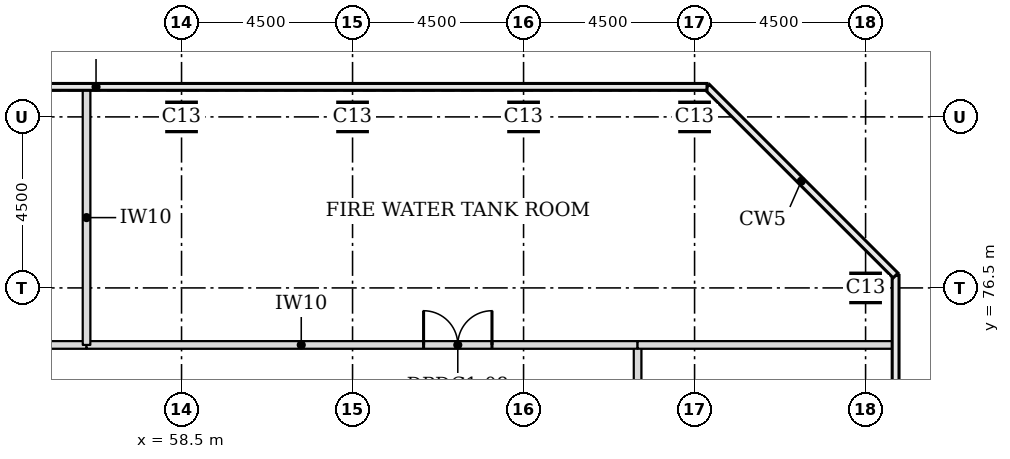
"""IFC4 building model, lengths in metres.
Left out: names, types, materials, properties, quantities, classifications, styles, units other than length and angle.
Written with IfcOpenShell. Run it as: python <this file> out.ifc"""

import sys

from ifc_helpers import new_model, si_unit, direction, frame, frame_2d, origin, origin_2d, place, context, subcontext, project, spatial, rectangle, extrude, element, fill, save


model = new_model("IFC4")
c1 = context("Model", 3, precision=1e-05, world=origin(), true_north=direction((0.0, 1.0)))
c2 = subcontext(c1, "Body", "Model", "MODEL_VIEW")
j1 = project(units=[si_unit("LENGTHUNIT", "METRE"), si_unit("PLANEANGLEUNIT", "RADIAN")], contexts=[c1])
p1 = place(None, origin())
s1 = spatial("IfcSite", under=j1, at=p1, CompositionType="ELEMENT")
p2 = place(p1, origin())
s2 = spatial("IfcBuilding", under=s1, at=p2, CompositionType="ELEMENT")
p3 = place(p2, frame((0.0, 0.0, 263.7)))
s3 = spatial("IfcBuildingStorey", under=s2, at=p3, CompositionType="ELEMENT", Elevation=263.7)
for number, where, z_axis, x_axis in (
    (1, (76.5, 76.5, 0.0), (0.0, 0.0, 1.0), (1.0, 0.0, 0.0)),
    (2, (58.5, 81.0, 0.0), (0.0, 0.0, 1.0), (1.0, 0.0, 0.0)),
    (3, (63.0, 81.0, 0.0), (0.0, 0.0, 1.0), (1.0, 0.0, 0.0)),
    (4, (67.5, 81.0, 0.0), (0.0, 0.0, 1.0), (1.0, 0.0, 0.0)),
    (5, (72.0, 81.0, 0.0), (0.0, 0.0, 1.0), (1.0, 0.0, 0.0)),
):
    element("IfcColumn", number, at=place(p3, frame(where, z_axis=z_axis, x_axis=x_axis)), inside=s3, PredefinedType="COLUMN", context=c2, shape_type="SweptSolid", body=[
        extrude(rectangle(XDim=0.7, YDim=0.7, at=origin_2d()), origin(), (0.0, 0.0, 1.0), 5.0),
    ])
p4 = place(p3, frame((70.5, 60.0, 0.0), z_axis=(0.0, 0.0, 1.0), x_axis=(0.0, 1.0, 0.0)))
e6 = element("IfcWall", 6, at=p4, inside=s3, PredefinedType="PARTITIONING", context=c2, shape_type="SweptSolid", body=[
    extrude(rectangle(XDim=15.0, YDim=0.2, at=frame_2d((7.5, 0.0))), origin(), (0.0, 0.0, 1.0), 4.75),
])
p5 = place(p4, frame((7.0, 0.0, 0.0)))
e7 = element("IfcOpeningElement", 7, at=p5, cuts=e6, PredefinedType="OPENING", context=c2, shape_type="SweptSolid", body=[
    extrude(rectangle(XDim=1.0, YDim=2.1, at=frame_2d((0.5, 1.05))), frame((0.0, 0.11, 0.0), z_axis=(0.0, -1.0, 0.0), x_axis=(1.0, 0.0, 0.0)), (0.0, 0.0, 1.0), 0.22),
])
p6 = place(p3, frame((42.0, 75.0, 0.0), z_axis=(0.0, 0.0, 1.0), x_axis=(1.0, 0.0, 0.0)))
e8 = element("IfcWall", 8, at=p6, inside=s3, PredefinedType="PARTITIONING", context=c2, shape_type="SweptSolid", body=[
    extrude(rectangle(XDim=14.0, YDim=0.2, at=frame_2d((7.0, 0.0))), origin(), (0.0, 0.0, 1.0), 4.75),
])
p7 = place(p6, frame((6.5, 0.0, 0.0)))
e9 = element("IfcOpeningElement", 9, at=p7, cuts=e8, PredefinedType="OPENING", context=c2, shape_type="SweptSolid", body=[
    extrude(rectangle(XDim=1.0, YDim=2.1, at=frame_2d((0.5, 1.05))), frame((0.0, 0.11, 0.0), z_axis=(0.0, -1.0, 0.0), x_axis=(1.0, 0.0, 0.0)), (0.0, 0.0, 1.0), 0.22),
])
p8 = place(p3, frame((56.0, 75.0, 0.0), z_axis=(0.0, 0.0, 1.0), x_axis=(1.0, 0.0, 0.0)))
e10 = element("IfcWall", 10, at=p8, inside=s3, PredefinedType="PARTITIONING", context=c2, shape_type="SweptSolid", body=[
    extrude(rectangle(XDim=14.5, YDim=0.2, at=frame_2d((7.25, 0.0))), origin(), (0.0, 0.0, 1.0), 4.75),
])
p9 = place(p8, frame((8.869, 0.0, 0.0)))
e11 = element("IfcOpeningElement", 11, at=p9, cuts=e10, PredefinedType="OPENING", context=c2, shape_type="SweptSolid", body=[
    extrude(rectangle(XDim=1.8, YDim=2.1, at=frame_2d((0.9, 1.05))), frame((0.0, 0.11, 0.0), z_axis=(0.0, -1.0, 0.0), x_axis=(1.0, 0.0, 0.0)), (0.0, 0.0, 1.0), 0.22),
])
for number, where, z_axis, x_axis in (
    (12, (56.0, 75.0, 0.0), (0.0, 0.0, 1.0), (0.0, 1.0, 0.0)),
    (13, (70.5, 75.0, 0.0), (0.0, 0.0, 1.0), (1.0, 0.0, 0.0)),
):
    element("IfcWall", number, at=place(p3, frame(where, z_axis=z_axis, x_axis=x_axis)), inside=s3, PredefinedType="PARTITIONING", context=c2, shape_type="SweptSolid", body=[
        extrude(rectangle(XDim=6.7, YDim=0.2, at=frame_2d((3.35, 0.0))), origin(), (0.0, 0.0, 1.0), 4.75),
    ])
p10 = place(p9, origin())
e14 = element("IfcDoor", 14, at=p10, inside=s3, OperationType="DOUBLE_DOOR_SINGLE_SWING", PredefinedType="DOOR", context=c2, shape_type="SweptSolid", body=[
    extrude(rectangle(XDim=1.8, YDim=2.1, at=frame_2d((0.9, 1.05))), frame((0.0, 0.025, 0.0), z_axis=(0.0, -1.0, 0.0), x_axis=(1.0, 0.0, 0.0)), (0.0, 0.0, 1.0), 0.05),
])
fill(e11, e14)
save(model, sys.argv[1])
